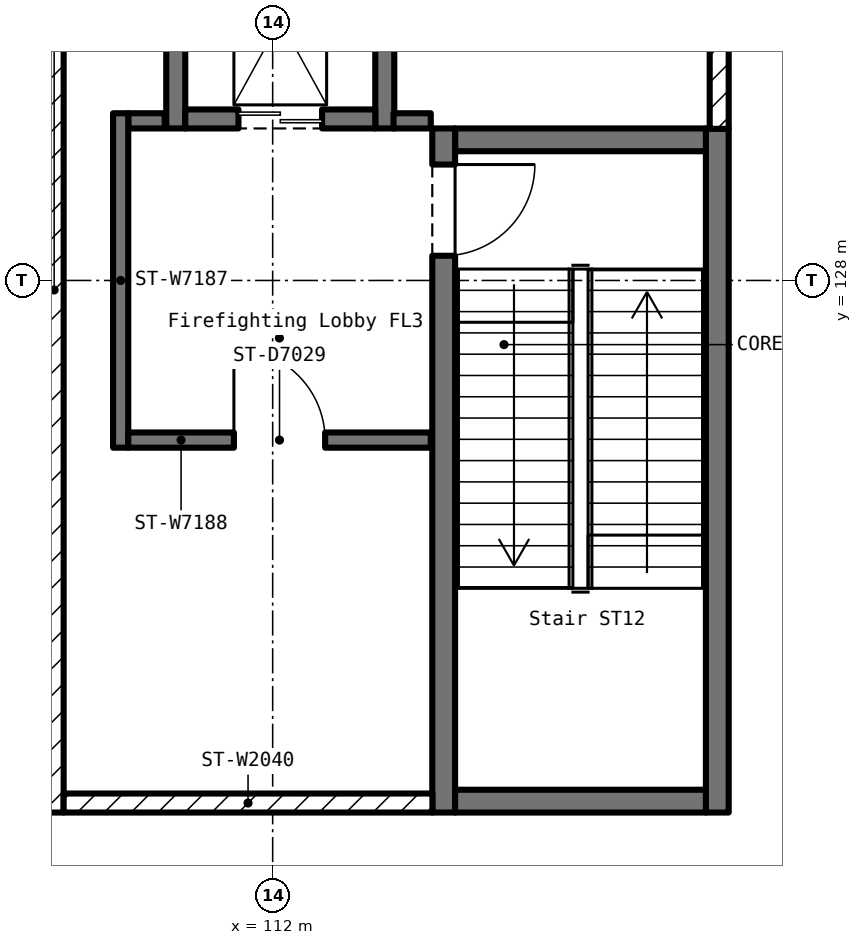
"""IFC4 building model, lengths in metres.
Left out: names, types, materials, properties, quantities, classifications, styles, units other than length and angle.
Written with IfcOpenShell. Run it as: python <this file> out.ifc"""

import sys

from ifc_helpers import new_model, si_unit, direction, frame, frame_2d, origin, place, context, subcontext, project, spatial, rectangle, extrude, element, fill, save


model = new_model("IFC4")
c1 = context("Model", 3, precision=1e-05, world=origin(), true_north=direction((0.0, 1.0)))
c2 = subcontext(c1, "Body", "Model", "MODEL_VIEW")
j1 = project(units=[si_unit("LENGTHUNIT", "METRE"), si_unit("PLANEANGLEUNIT", "RADIAN")], contexts=[c1])
p1 = place(None, origin())
s1 = spatial("IfcSite", under=j1, at=p1, CompositionType="ELEMENT")
p2 = place(p1, origin())
s2 = spatial("IfcBuilding", under=s1, at=p2, CompositionType="ELEMENT")
p3 = place(p2, frame((0.0, 0.0, 22.5)))
s3 = spatial("IfcBuildingStorey", under=s2, at=p3, CompositionType="ELEMENT", Elevation=22.5)
p4 = place(p3, frame((117.85, 121.0, 0.0), z_axis=(0.0, 0.0, 1.0), x_axis=(0.0, 1.0, 0.0)))
e1 = element("IfcWall", 1, at=p4, inside=s3, PredefinedType="SOLIDWALL", context=c2, shape_type="SweptSolid", body=[
    extrude(rectangle(XDim=9.0, YDim=0.3, at=frame_2d((4.5, 0.0))), origin(), (0.0, 0.0, 1.0), 5.5),
])
p5 = place(p3, frame((117.7, 129.85, 0.0), z_axis=(0.0, 0.0, 1.0), x_axis=(-1.0, 0.0, 0.0)))
e2 = element("IfcWall", 2, at=p5, inside=s3, PredefinedType="SOLIDWALL", context=c2, shape_type="SweptSolid", body=[
    extrude(rectangle(XDim=3.3, YDim=0.3, at=frame_2d((1.65, 0.0))), origin(), (0.0, 0.0, 1.0), 5.5),
])
p6 = place(p3, frame((114.25, 130.0, 0.0), z_axis=(0.0, 0.0, 1.0), x_axis=(0.0, -1.0, 0.0)))
e3 = element("IfcWall", 3, at=p6, inside=s3, PredefinedType="SOLIDWALL", context=c2, shape_type="SweptSolid", body=[
    extrude(rectangle(XDim=9.0, YDim=0.3, at=frame_2d((4.5, 0.0))), origin(), (0.0, 0.0, 1.0), 5.5),
])
p7 = place(p6, frame((0.475, 0.0, 0.0)))
e4 = element("IfcOpeningElement", 4, at=p7, cuts=e3, PredefinedType="OPENING", context=c2, shape_type="SweptSolid", body=[
    extrude(rectangle(XDim=1.2, YDim=2.1, at=frame_2d((0.6, 1.05))), frame((0.0, 0.162, 0.0), z_axis=(0.0, -1.0, 0.0), x_axis=(1.0, 0.0, 0.0)), (0.0, 0.0, 1.0), 0.324),
])
p8 = place(p3, frame((114.4, 121.15, 0.0), z_axis=(0.0, 0.0, 1.0), x_axis=(1.0, 0.0, 0.0)))
e5 = element("IfcWall", 5, at=p8, inside=s3, PredefinedType="SOLIDWALL", context=c2, shape_type="SweptSolid", body=[
    extrude(rectangle(XDim=3.3, YDim=0.3, at=frame_2d((1.65, 0.0))), origin(), (0.0, 0.0, 1.0), 5.5),
])
for number, where, z_axis, x_axis in (
    (6, (113.475, 130.0, 0.0), (0.0, 0.0, 1.0), (0.0, 1.0, 0.0)),
    (7, (110.725, 134.0, 0.0), (0.0, 0.0, 1.0), (0.0, -1.0, 0.0)),
):
    element("IfcWall", number, at=place(p3, frame(where, z_axis=z_axis, x_axis=x_axis)), inside=s3, PredefinedType="SOLIDWALL", context=c2, shape_type="SweptSolid", body=[
        extrude(rectangle(XDim=4.0, YDim=0.25, at=frame_2d((2.0, 0.0))), origin(), (0.0, 0.0, 1.0), 5.5),
    ])
p9 = place(p3, frame((110.85, 130.125, 0.0), z_axis=(0.0, 0.0, 1.0), x_axis=(1.0, 0.0, 0.0)))
e8 = element("IfcWall", 8, at=p9, inside=s3, PredefinedType="SOLIDWALL", context=c2, shape_type="SweptSolid", body=[
    extrude(rectangle(XDim=2.5, YDim=0.25, at=frame_2d((1.25, 0.0))), origin(), (0.0, 0.0, 1.0), 5.5),
])
p10 = place(p9, frame((0.7, 0.0, 0.0)))
e9 = element("IfcOpeningElement", 9, at=p10, cuts=e8, PredefinedType="OPENING", context=c2, shape_type="SweptSolid", body=[
    extrude(rectangle(XDim=1.1, YDim=2.1, at=frame_2d((0.55, 1.05))), frame((0.0, 0.137, 0.0), z_axis=(0.0, -1.0, 0.0), x_axis=(1.0, 0.0, 0.0)), (0.0, 0.0, 1.0), 0.274),
])
p11 = place(p3, frame((114.08, 130.1, 0.0), z_axis=(0.0, 0.0, 1.0), x_axis=(-1.0, 0.0, 0.0)))
e10 = element("IfcWall", 10, at=p11, inside=s3, PredefinedType="PARTITIONING", context=c2, shape_type="SweptSolid", body=[
    extrude(rectangle(XDim=0.49, YDim=0.2, at=frame_2d((0.245, 0.0))), origin(), (0.0, 0.0, 1.0), 5.28),
])
p12 = place(p3, frame((110.58, 130.1, 0.0), z_axis=(0.0, 0.0, 1.0), x_axis=(-1.0, 0.0, 0.0)))
e11 = element("IfcWall", 11, at=p12, inside=s3, PredefinedType="PARTITIONING", context=c2, shape_type="SweptSolid", body=[
    extrude(rectangle(XDim=0.48, YDim=0.2, at=frame_2d((0.24, 0.0))), origin(), (0.0, 0.0, 1.0), 5.28),
])
p13 = place(p3, frame((110.0, 130.2, 0.0), z_axis=(0.0, 0.0, 1.0), x_axis=(0.0, -1.0, 0.0)))
e12 = element("IfcWall", 12, at=p13, inside=s3, PredefinedType="PARTITIONING", context=c2, shape_type="SweptSolid", body=[
    extrude(rectangle(XDim=4.4, YDim=0.2, at=frame_2d((2.2, 0.0))), origin(), (0.0, 0.0, 1.0), 5.28),
])
p14 = place(p3, frame((110.1, 125.9, 0.0), z_axis=(0.0, 0.0, 1.0), x_axis=(1.0, 0.0, 0.0)))
e13 = element("IfcWall", 13, at=p14, inside=s3, PredefinedType="PARTITIONING", context=c2, shape_type="SweptSolid", body=[
    extrude(rectangle(XDim=3.98, YDim=0.2, at=frame_2d((1.99, 0.0))), origin(), (0.0, 0.0, 1.0), 5.28),
])
p15 = place(p14, frame((1.39, 0.0, 0.0)))
e14 = element("IfcOpeningElement", 14, at=p15, cuts=e13, PredefinedType="OPENING", context=c2, shape_type="SweptSolid", body=[
    extrude(rectangle(XDim=1.2, YDim=2.1, at=frame_2d((0.6, 1.05))), frame((0.0, 0.112, 0.0), z_axis=(0.0, -1.0, 0.0), x_axis=(1.0, 0.0, 0.0)), (0.0, 0.0, 1.0), 0.224),
])
p16 = place(p3, frame((117.875, 129.995, 0.0), z_axis=(0.0, 0.0, 1.0), x_axis=(0.0, 1.0, 0.0)))
e15 = element("IfcWall", 15, at=p16, inside=s3, PredefinedType="SOLIDWALL", context=c2, shape_type="SweptSolid", body=[
    extrude(rectangle(XDim=5.005, YDim=0.25, at=frame_2d((2.502, 0.0))), origin(), (0.0, 0.0, 1.0), 5.28),
])
p17 = place(p16, frame((1.43, 0.0, 2.6)))
e16 = element("IfcOpeningElement", 16, at=p17, cuts=e15, PredefinedType="OPENING", context=c2, shape_type="SweptSolid", body=[
    extrude(rectangle(XDim=2.4, YDim=1.2, at=frame_2d((1.2, 0.6))), frame((0.0, 0.137, 0.0), z_axis=(0.0, -1.0, 0.0), x_axis=(1.0, 0.0, 0.0)), (0.0, 0.0, 1.0), 0.274),
])
p18 = place(p3, frame((109.125, 134.75, 0.0), z_axis=(0.0, 0.0, 1.0), x_axis=(0.0, -1.0, 0.0)))
e17 = element("IfcWall", 17, at=p18, inside=s3, PredefinedType="SOLIDWALL", context=c2, shape_type="SweptSolid", body=[
    extrude(rectangle(XDim=13.75, YDim=0.25, at=frame_2d((6.875, 0.0))), origin(), (0.0, 0.0, 1.0), 5.28),
])
p19 = place(p3, frame((109.25, 121.125, 0.0), z_axis=(0.0, 0.0, 1.0), x_axis=(1.0, 0.0, 0.0)))
e18 = element("IfcWall", 18, at=p19, inside=s3, PredefinedType="SOLIDWALL", context=c2, shape_type="SweptSolid", body=[
    extrude(rectangle(XDim=4.852, YDim=0.25, at=frame_2d((2.426, 0.0))), origin(), (0.0, 0.0, 1.0), 5.28),
])
p20 = place(p7, origin())
e19 = element("IfcDoor", 19, at=p20, inside=s3, OperationType="SINGLE_SWING_LEFT", PredefinedType="DOOR", context=c2, shape_type="SweptSolid", body=[
    extrude(rectangle(XDim=1.2, YDim=2.1, at=frame_2d((0.6, 1.05))), frame((0.0, 0.025, 0.0), z_axis=(0.0, -1.0, 0.0), x_axis=(1.0, 0.0, 0.0)), (0.0, 0.0, 1.0), 0.05),
])
fill(e4, e19)
p21 = place(p10, origin())
e20 = element("IfcDoor", 20, at=p21, inside=s3, OperationType="DOUBLE_DOOR_SLIDING", PredefinedType="DOOR", context=c2, shape_type="SweptSolid", body=[
    extrude(rectangle(XDim=1.1, YDim=2.1, at=frame_2d((0.55, 1.05))), frame((0.0, 0.025, 0.0), z_axis=(0.0, -1.0, 0.0), x_axis=(1.0, 0.0, 0.0)), (0.0, 0.0, 1.0), 0.05),
])
fill(e9, e20)
p22 = place(p15, origin())
e21 = element("IfcDoor", 21, at=p22, inside=s3, OperationType="SINGLE_SWING_LEFT", PredefinedType="DOOR", context=c2, shape_type="SweptSolid", body=[
    extrude(rectangle(XDim=1.2, YDim=2.1, at=frame_2d((0.6, 1.05))), frame((0.0, 0.025, 0.0), z_axis=(0.0, -1.0, 0.0), x_axis=(1.0, 0.0, 0.0)), (0.0, 0.0, 1.0), 0.05),
])
fill(e14, e21)
save(model, sys.argv[1])
